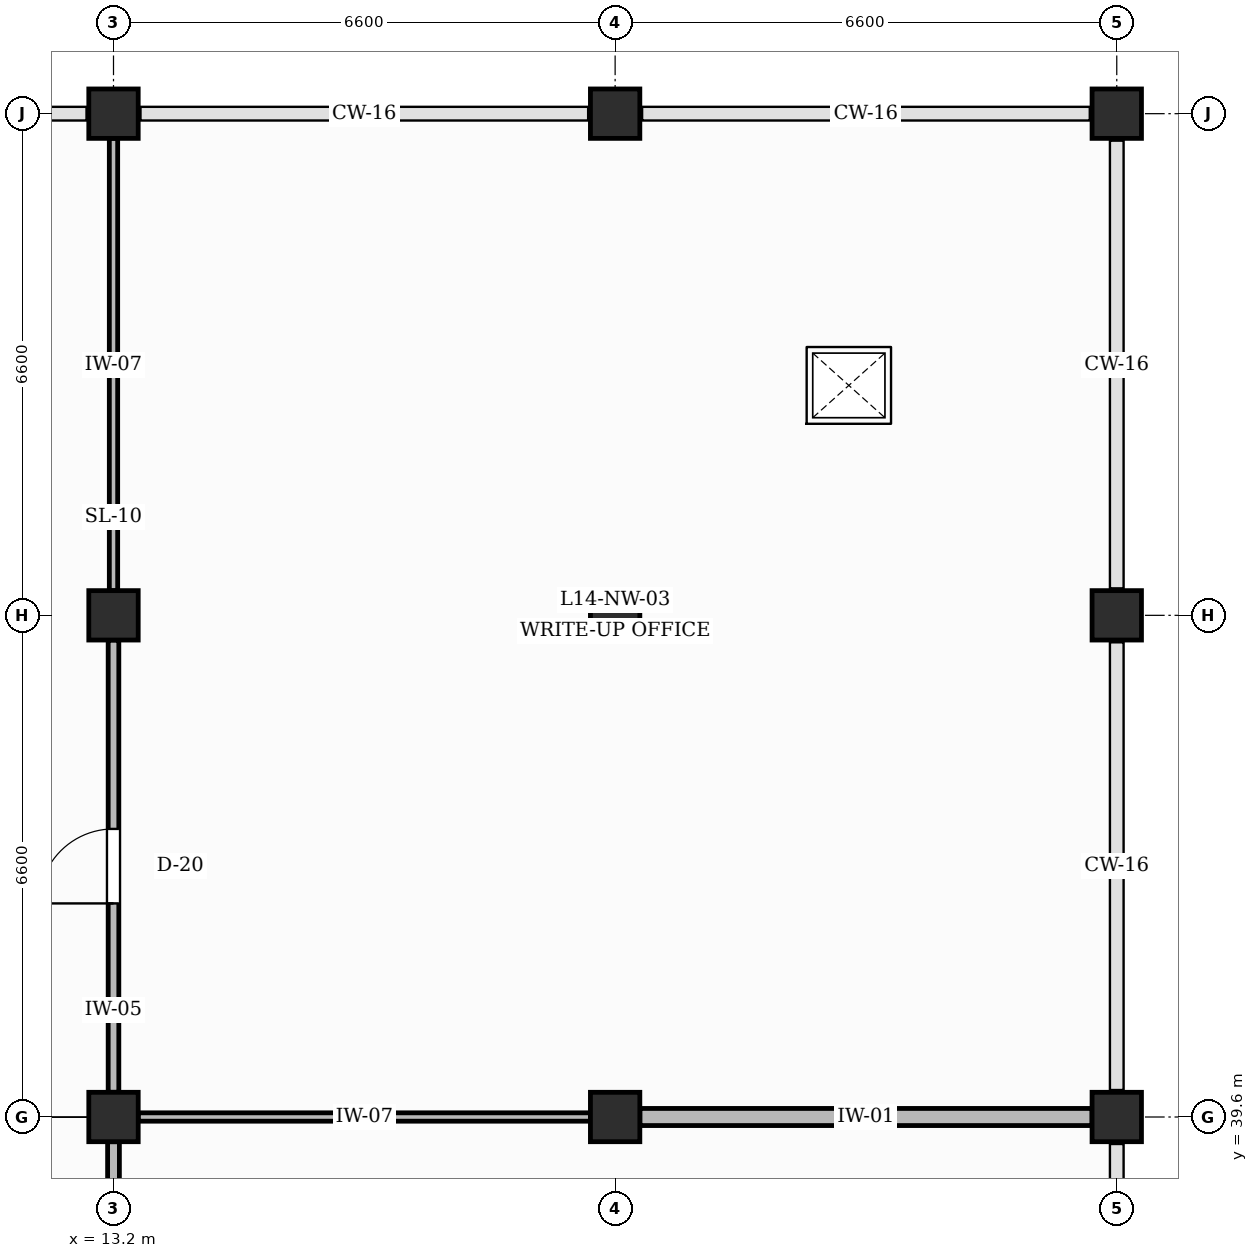
"""IFC4 building model, lengths in metres.
Left out: names, types, materials, properties, quantities, classifications, styles, units other than length and angle.
Written with IfcOpenShell. Run it as: python <this file> out.ifc"""

import sys

from ifc_helpers import new_model, si_unit, direction, frame, frame_2d, origin, origin_2d, place, context, subcontext, project, spatial, rectangle, extrude, element, fill, save


model = new_model("IFC4")
c1 = context("Model", 3, precision=1e-05, world=origin(), true_north=direction((0.0, 1.0)))
c2 = subcontext(c1, "Body", "Model", "MODEL_VIEW")
j1 = project(units=[si_unit("LENGTHUNIT", "METRE"), si_unit("PLANEANGLEUNIT", "RADIAN")], contexts=[c1])
p1 = place(None, origin())
s1 = spatial("IfcSite", under=j1, at=p1, CompositionType="ELEMENT")
p2 = place(p1, origin())
s2 = spatial("IfcBuilding", under=s1, at=p2, CompositionType="ELEMENT")
p3 = place(p2, frame((0.0, 0.0, 60.6)))
s3 = spatial("IfcBuildingStorey", under=s2, at=p3, CompositionType="ELEMENT", Elevation=60.6)
for number, where, z_axis, x_axis in (
    (1, (13.2, 39.6, 0.0), (0.0, 0.0, 1.0), (1.0, 0.0, 0.0)),
    (2, (13.2, 46.2, 0.0), (0.0, 0.0, 1.0), (1.0, 0.0, 0.0)),
    (3, (13.2, 52.8, 0.0), (0.0, 0.0, 1.0), (1.0, 0.0, 0.0)),
    (4, (19.8, 39.6, 0.0), (0.0, 0.0, 1.0), (1.0, 0.0, 0.0)),
    (5, (19.8, 46.2, 0.0), (0.0, 0.0, 1.0), (1.0, 0.0, 0.0)),
    (6, (19.8, 52.8, 0.0), (0.0, 0.0, 1.0), (1.0, 0.0, 0.0)),
    (7, (26.4, 39.6, 0.0), (0.0, 0.0, 1.0), (1.0, 0.0, 0.0)),
    (8, (26.4, 46.2, 0.0), (0.0, 0.0, 1.0), (1.0, 0.0, 0.0)),
    (9, (26.4, 52.8, 0.0), (0.0, 0.0, 1.0), (1.0, 0.0, 0.0)),
):
    element("IfcColumn", number, at=place(p3, frame(where, z_axis=z_axis, x_axis=x_axis)), inside=s3, PredefinedType="COLUMN", context=c2, shape_type="SweptSolid", body=[
        extrude(rectangle(XDim=0.65, YDim=0.65, at=origin_2d()), origin(), (0.0, 0.0, 1.0), 4.2),
    ])
p4 = place(p3, frame((13.2, 33.325, 0.0), z_axis=(0.0, 0.0, 1.0), x_axis=(0.0, 1.0, 0.0)))
e10 = element("IfcWall", 10, at=p4, inside=s3, PredefinedType="PARTITIONING", context=c2, shape_type="SweptSolid", body=[
    extrude(rectangle(XDim=5.95, YDim=0.155, at=frame_2d((2.975, 0.0))), origin(), (0.0, 0.0, 1.0), 3.31),
])
p5 = place(p3, frame((13.2, 39.925, 0.0), z_axis=(0.0, 0.0, 1.0), x_axis=(0.0, 1.0, 0.0)))
e11 = element("IfcWall", 11, at=p5, inside=s3, PredefinedType="PARTITIONING", context=c2, shape_type="SweptSolid", body=[
    extrude(rectangle(XDim=5.95, YDim=0.14, at=frame_2d((2.975, 0.0))), origin(), (0.0, 0.0, 1.0), 3.31),
])
p6 = place(p5, frame((2.485, 0.0, 0.0)))
e12 = element("IfcOpeningElement", 12, at=p6, cuts=e11, PredefinedType="OPENING", context=c2, shape_type="SweptSolid", body=[
    extrude(rectangle(XDim=0.98, YDim=2.15, at=frame_2d((0.49, 1.075))), frame((0.0, 0.08, 0.0), z_axis=(0.0, -1.0, 0.0), x_axis=(1.0, 0.0, 0.0)), (0.0, 0.0, 1.0), 0.16),
])
for number, where, z_axis, x_axis in (
    (13, (13.2, 46.525, 0.0), (0.0, 0.0, 1.0), (0.0, 1.0, 0.0)),
    (14, (13.525, 39.6, 0.0), (0.0, 0.0, 1.0), (1.0, 0.0, 0.0)),
):
    element("IfcWall", number, at=place(p3, frame(where, z_axis=z_axis, x_axis=x_axis)), inside=s3, PredefinedType="PARTITIONING", context=c2, shape_type="SweptSolid", body=[
        extrude(rectangle(XDim=5.95, YDim=0.11, at=frame_2d((2.975, 0.0))), origin(), (0.0, 0.0, 1.0), 3.31),
    ])
p7 = place(p3, frame((20.125, 39.6, 0.0), z_axis=(0.0, 0.0, 1.0), x_axis=(1.0, 0.0, 0.0)))
e15 = element("IfcWall", 15, at=p7, inside=s3, PredefinedType="PARTITIONING", context=c2, shape_type="SweptSolid", body=[
    extrude(rectangle(XDim=5.95, YDim=0.225, at=frame_2d((2.975, 0.0))), origin(), (0.0, 0.0, 1.0), 3.31),
])
p8 = place(p6, origin())
e16 = element("IfcDoor", 16, at=p8, inside=s3, OperationType="SINGLE_SWING_LEFT", PredefinedType="DOOR", context=c2, shape_type="SweptSolid", body=[
    extrude(rectangle(XDim=0.98, YDim=2.15, at=frame_2d((0.49, 1.075))), frame((0.0, 0.025, 0.0), z_axis=(0.0, -1.0, 0.0), x_axis=(1.0, 0.0, 0.0)), (0.0, 0.0, 1.0), 0.05),
])
fill(e12, e16)
save(model, sys.argv[1])
